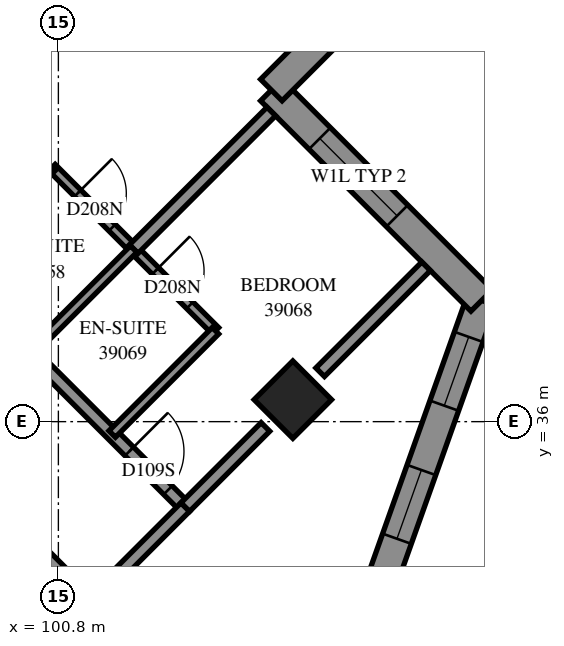
"""IFC4 building model, lengths in metres.
Left out: names, types, materials, properties, quantities, classifications, styles, units other than length and angle.
Written with IfcOpenShell. Run it as: python <this file> out.ifc"""

import sys

from ifc_helpers import new_model, si_unit, direction, frame, frame_2d, origin, origin_2d, place, context, subcontext, project, spatial, polyline, rectangle, outline, extrude, element, fill, save


model = new_model("IFC4")
c1 = context("Model", 3, precision=1e-05, world=origin(), true_north=direction((0.0, 1.0)))
c2 = subcontext(c1, "Body", "Model", "MODEL_VIEW")
j1 = project(units=[si_unit("LENGTHUNIT", "METRE"), si_unit("PLANEANGLEUNIT", "RADIAN")], contexts=[c1])
p1 = place(None, origin())
s1 = spatial("IfcSite", under=j1, at=p1, CompositionType="ELEMENT")
p2 = place(p1, origin())
s2 = spatial("IfcBuilding", under=s1, at=p2, CompositionType="ELEMENT")
p3 = place(p2, frame((0.0, 0.0, 145.6)))
s3 = spatial("IfcBuildingStorey", under=s2, at=p3, CompositionType="ELEMENT", Elevation=145.6)
p4 = place(p3, frame((104.656, 36.362, 0.0), z_axis=(0.0, 0.0, 1.0), x_axis=(0.7071067812, -0.7071067812, 0.0)))
e1 = element("IfcColumn", 1, at=p4, inside=s3, PredefinedType="COLUMN", context=c2, shape_type="SweptSolid", body=[
    extrude(rectangle(XDim=0.9, YDim=0.9, at=origin_2d()), origin(), (0.0, 0.0, 1.0), 3.1),
])
p5 = place(p3, frame((105.98, 32.984, 0.0), z_axis=(0.0, 0.0, 1.0), x_axis=(0.3349755344, 0.9422268259, 0.0)))
e2 = element("IfcWall", 2, at=p5, inside=s3, PredefinedType="SOLIDWALL", context=c2, shape_type="SweptSolid", body=[
    extrude(outline(polyline([(-0.114, -0.25), (5.475, -0.25), (5.16, 0.25), (0.114, 0.25), (-0.114, -0.25)])), origin(), (0.0, 0.0, 1.0), 3.1),
])
p6 = place(p5, frame((1.158, 0.0, 0.45)))
e3 = element("IfcOpeningElement", 3, at=p6, cuts=e2, PredefinedType="OPENING", context=c2, shape_type="SweptSolid", body=[
    extrude(rectangle(XDim=1.2, YDim=2.5, at=frame_2d((0.6, 1.25))), frame((0.0, 0.26, 0.0), z_axis=(0.0, -1.0, 0.0), x_axis=(1.0, 0.0, 0.0)), (0.0, 0.0, 1.0), 0.52),
])
p7 = place(p5, frame((3.48, 0.0, 0.45)))
e4 = element("IfcOpeningElement", 4, at=p7, cuts=e2, PredefinedType="OPENING", context=c2, shape_type="SweptSolid", body=[
    extrude(rectangle(XDim=1.2, YDim=2.5, at=frame_2d((0.6, 1.25))), frame((0.0, 0.26, 0.0), z_axis=(0.0, -1.0, 0.0), x_axis=(1.0, 0.0, 0.0)), (0.0, 0.0, 1.0), 0.52),
])
p8 = place(p3, frame((107.761, 37.994, 0.0), z_axis=(0.0, 0.0, 1.0), x_axis=(-0.7071170016, 0.7070965606, 0.0)))
e5 = element("IfcWall", 5, at=p8, inside=s3, PredefinedType="SOLIDWALL", context=c2, shape_type="SweptSolid", body=[
    extrude(outline(polyline([(-0.158, -0.25), (4.642, -0.25), (5.142, 0.25), (0.158, 0.25), (-0.158, -0.25)])), origin(), (0.0, 0.0, 1.0), 3.1),
])
p9 = place(p8, frame((1.967, 0.0, 0.6)))
e6 = element("IfcOpeningElement", 6, at=p9, cuts=e5, PredefinedType="OPENING", context=c2, shape_type="SweptSolid", body=[
    extrude(rectangle(XDim=1.8, YDim=1.9, at=frame_2d((0.9, 0.95))), frame((0.0, 0.26, 0.0), z_axis=(0.0, -1.0, 0.0), x_axis=(1.0, 0.0, 0.0)), (0.0, 0.0, 1.0), 0.52),
])
p10 = place(p3, frame((104.302, 41.453, 0.0), z_axis=(0.0, 0.0, 1.0), x_axis=(0.7071155421, 0.7070980202, 0.0)))
e7 = element("IfcWall", 7, at=p10, inside=s3, PredefinedType="SOLIDWALL", context=c2, shape_type="SweptSolid", body=[
    extrude(outline(polyline([(0.25, -0.25), (6.041, -0.25), (5.373, 0.25), (-0.25, 0.25), (0.25, -0.25)])), origin(), (0.0, 0.0, 1.0), 3.1),
])
p11 = place(p10, frame((1.125, 0.0, 0.6)))
e8 = element("IfcOpeningElement", 8, at=p11, cuts=e7, PredefinedType="OPENING", context=c2, shape_type="SweptSolid", body=[
    extrude(rectangle(XDim=1.8, YDim=1.9, at=frame_2d((0.9, 0.95))), frame((0.0, 0.26, 0.0), z_axis=(0.0, -1.0, 0.0), x_axis=(1.0, 0.0, 0.0)), (0.0, 0.0, 1.0), 0.52),
])
p12 = place(p3, frame((94.189, 43.287, 0.0), z_axis=(0.0, 0.0, 1.0), x_axis=(0.7071067812, -0.7071067812, 0.0)))
e9 = element("IfcWall", 9, at=p12, inside=s3, PredefinedType="PARTITIONING", context=c2, shape_type="SweptSolid", body=[
    extrude(rectangle(XDim=12.298, YDim=0.2, at=frame_2d((6.149, 0.0))), origin(), (0.0, 0.0, 1.0), 3.1),
])
p13 = place(p12, frame((3.755, 0.0, 0.0)))
e10 = element("IfcOpeningElement", 10, at=p13, cuts=e9, PredefinedType="OPENING", context=c2, shape_type="SweptSolid", body=[
    extrude(rectangle(XDim=0.9, YDim=2.1, at=frame_2d((0.45, 1.05))), frame((0.0, 0.11, 0.0), z_axis=(0.0, -1.0, 0.0), x_axis=(1.0, 0.0, 0.0)), (0.0, 0.0, 1.0), 0.22),
])
p14 = place(p12, frame((10.998, 0.0, 0.0)))
e11 = element("IfcOpeningElement", 11, at=p14, cuts=e9, PredefinedType="OPENING", context=c2, shape_type="SweptSolid", body=[
    extrude(rectangle(XDim=0.9, YDim=2.1, at=frame_2d((0.45, 1.05))), frame((0.0, 0.11, 0.0), z_axis=(0.0, -1.0, 0.0), x_axis=(1.0, 0.0, 0.0)), (0.0, 0.0, 1.0), 0.22),
])
p15 = place(p3, frame((100.694, 40.178, 0.0), z_axis=(0.0, 0.0, 1.0), x_axis=(0.7076329021, -0.7065802685, 0.0)))
e12 = element("IfcWall", 12, at=p15, inside=s3, PredefinedType="PARTITIONING", context=c2, shape_type="SweptSolid", body=[
    extrude(rectangle(XDim=3.8, YDim=0.15, at=frame_2d((1.9, 0.0))), origin(), (0.0, 0.0, 1.0), 3.1),
])
p16 = place(p15, frame((0.598, 0.0, 0.0)))
e13 = element("IfcOpeningElement", 13, at=p16, cuts=e12, PredefinedType="OPENING", context=c2, shape_type="SweptSolid", body=[
    extrude(rectangle(XDim=0.8, YDim=2.1, at=frame_2d((0.4, 1.05))), frame((0.0, 0.085, 0.0), z_axis=(0.0, -1.0, 0.0), x_axis=(1.0, 0.0, 0.0)), (0.0, 0.0, 1.0), 0.17),
])
p17 = place(p15, frame((2.405, 0.0, 0.0)))
e14 = element("IfcOpeningElement", 14, at=p17, cuts=e12, PredefinedType="OPENING", context=c2, shape_type="SweptSolid", body=[
    extrude(rectangle(XDim=0.8, YDim=2.1, at=frame_2d((0.4, 1.05))), frame((0.0, 0.085, 0.0), z_axis=(0.0, -1.0, 0.0), x_axis=(1.0, 0.0, 0.0)), (0.0, 0.0, 1.0), 0.17),
])
p18 = place(p3, frame((102.04, 38.838, 0.0), z_axis=(0.0, 0.0, 1.0), x_axis=(0.7071067812, 0.7071067812, 0.0)))
e15 = element("IfcWall", 15, at=p18, inside=s3, PredefinedType="PARTITIONING", context=c2, shape_type="SweptSolid", body=[
    extrude(rectangle(XDim=3.199, YDim=0.2, at=frame_2d((1.599, 0.0))), origin(), (0.0, 0.0, 1.0), 3.1),
])
p19 = place(p3, frame((99.214, 35.162, 0.0), z_axis=(0.0, 0.0, 1.0), x_axis=(0.706773319, -0.7074400862, 0.0)))
e16 = element("IfcWall", 16, at=p19, inside=s3, PredefinedType="PARTITIONING", context=c2, shape_type="SweptSolid", body=[
    extrude(rectangle(XDim=2.999, YDim=0.2, at=frame_2d((1.5, 0.0))), origin(), (0.0, 0.0, 1.0), 3.1),
])
p20 = place(p19, frame((0.22, 0.0, 0.0)))
e17 = element("IfcOpeningElement", 17, at=p20, cuts=e16, PredefinedType="OPENING", context=c2, shape_type="SweptSolid", body=[
    extrude(rectangle(XDim=0.9, YDim=2.1, at=frame_2d((0.45, 1.05))), frame((0.0, 0.11, 0.0), z_axis=(0.0, -1.0, 0.0), x_axis=(1.0, 0.0, 0.0)), (0.0, 0.0, 1.0), 0.22),
])
p21 = place(p3, frame((105.105, 36.813, 0.0), z_axis=(0.0, 0.0, 1.0), x_axis=(0.7071067812, 0.7071067812, 0.0)))
e18 = element("IfcWall", 18, at=p21, inside=s3, PredefinedType="PARTITIONING", context=c2, shape_type="SweptSolid", body=[
    extrude(rectangle(XDim=2.463, YDim=0.2, at=frame_2d((1.232, 0.0))), origin(), (0.0, 0.0, 1.0), 3.1),
])
p22 = place(p3, frame((101.685, 35.797, 0.0), z_axis=(0.0, 0.0, 1.0), x_axis=(0.7071067812, 0.7071067812, 0.0)))
e19 = element("IfcWall", 19, at=p22, inside=s3, PredefinedType="PARTITIONING", context=c2, shape_type="SweptSolid", body=[
    extrude(rectangle(XDim=2.401, YDim=0.15, at=frame_2d((1.201, 0.0))), origin(), (0.0, 0.0, 1.0), 3.1),
])
for number, where, z_axis, x_axis in (
    (20, (100.34, 37.142, 0.0), (0.0, 0.0, 1.0), (0.708, 0.707, 0.0)),
    (21, (98.996, 38.486, 0.0), (0.0, 0.0, 1.0), (0.708, 0.707, 0.0)),
):
    element("IfcWall", number, at=place(p3, frame(where, z_axis=z_axis, x_axis=x_axis)), inside=s3, PredefinedType="PARTITIONING", context=c2, shape_type="SweptSolid", body=[
        extrude(rectangle(XDim=2.4, YDim=0.15, at=frame_2d((1.2, 0.0))), origin(), (0.0, 0.0, 1.0), 3.1),
    ])
p23 = place(p3, frame((101.331, 33.039, 0.0), z_axis=(0.0, 0.0, 1.0), x_axis=(0.7071067812, 0.7071067812, 0.0)))
e22 = element("IfcWall", 22, at=p23, inside=s3, PredefinedType="PARTITIONING", context=c2, shape_type="SweptSolid", body=[
    extrude(rectangle(XDim=2.2, YDim=0.2, at=frame_2d((1.1, 0.0))), origin(), (0.0, 0.0, 1.0), 2.6),
])
p24 = place(p3, frame((102.887, 34.595, 0.0), z_axis=(0.0, 0.0, 1.0), x_axis=(0.7071067812, 0.7071067812, 0.0)))
e23 = element("IfcWall", 23, at=p24, inside=s3, PredefinedType="PARTITIONING", context=c2, shape_type="SweptSolid", body=[
    extrude(rectangle(XDim=1.864, YDim=0.2, at=frame_2d((0.932, 0.0))), origin(), (0.0, 0.0, 1.0), 2.6),
])
p25 = place(p6, origin())
e24 = element("IfcWindow", 24, at=p25, inside=s3, PartitioningType="SINGLE_PANEL", PredefinedType="WINDOW", context=c2, shape_type="SweptSolid", body=[
    extrude(rectangle(XDim=1.2, YDim=2.5, at=frame_2d((0.6, 1.25))), frame((0.0, 0.18, 0.0), z_axis=(0.0, -1.0, 0.0), x_axis=(1.0, 0.0, 0.0)), (0.0, 0.0, 1.0), 0.06),
])
fill(e3, e24)
p26 = place(p7, origin())
e25 = element("IfcWindow", 25, at=p26, inside=s3, PartitioningType="SINGLE_PANEL", PredefinedType="WINDOW", context=c2, shape_type="SweptSolid", body=[
    extrude(rectangle(XDim=1.2, YDim=2.5, at=frame_2d((0.6, 1.25))), frame((0.0, 0.18, 0.0), z_axis=(0.0, -1.0, 0.0), x_axis=(1.0, 0.0, 0.0)), (0.0, 0.0, 1.0), 0.06),
])
fill(e4, e25)
p27 = place(p9, origin())
e26 = element("IfcWindow", 26, at=p27, inside=s3, PartitioningType="SINGLE_PANEL", PredefinedType="WINDOW", context=c2, shape_type="SweptSolid", body=[
    extrude(rectangle(XDim=1.8, YDim=1.9, at=frame_2d((0.9, 0.95))), frame((0.0, 0.18, 0.0), z_axis=(0.0, -1.0, 0.0), x_axis=(1.0, 0.0, 0.0)), (0.0, 0.0, 1.0), 0.06),
])
fill(e6, e26)
p28 = place(p16, origin())
e27 = element("IfcDoor", 27, at=p28, inside=s3, OperationType="SINGLE_SWING_RIGHT", PredefinedType="DOOR", context=c2, shape_type="SweptSolid", body=[
    extrude(rectangle(XDim=0.8, YDim=2.1, at=frame_2d((0.4, 1.05))), frame((0.0, 0.025, 0.0), z_axis=(0.0, -1.0, 0.0), x_axis=(1.0, 0.0, 0.0)), (0.0, 0.0, 1.0), 0.05),
])
fill(e13, e27)
p29 = place(p14, origin())
e28 = element("IfcDoor", 28, at=p29, inside=s3, OperationType="SINGLE_SWING_RIGHT", PredefinedType="DOOR", context=c2, shape_type="SweptSolid", body=[
    extrude(rectangle(XDim=0.9, YDim=2.1, at=frame_2d((0.45, 1.05))), frame((0.0, 0.025, 0.0), z_axis=(0.0, -1.0, 0.0), x_axis=(1.0, 0.0, 0.0)), (0.0, 0.0, 1.0), 0.05),
])
fill(e11, e28)
p30 = place(p17, origin())
e29 = element("IfcDoor", 29, at=p30, inside=s3, OperationType="SINGLE_SWING_RIGHT", PredefinedType="DOOR", context=c2, shape_type="SweptSolid", body=[
    extrude(rectangle(XDim=0.8, YDim=2.1, at=frame_2d((0.4, 1.05))), frame((0.0, 0.025, 0.0), z_axis=(0.0, -1.0, 0.0), x_axis=(1.0, 0.0, 0.0)), (0.0, 0.0, 1.0), 0.05),
])
fill(e14, e29)
save(model, sys.argv[1])
